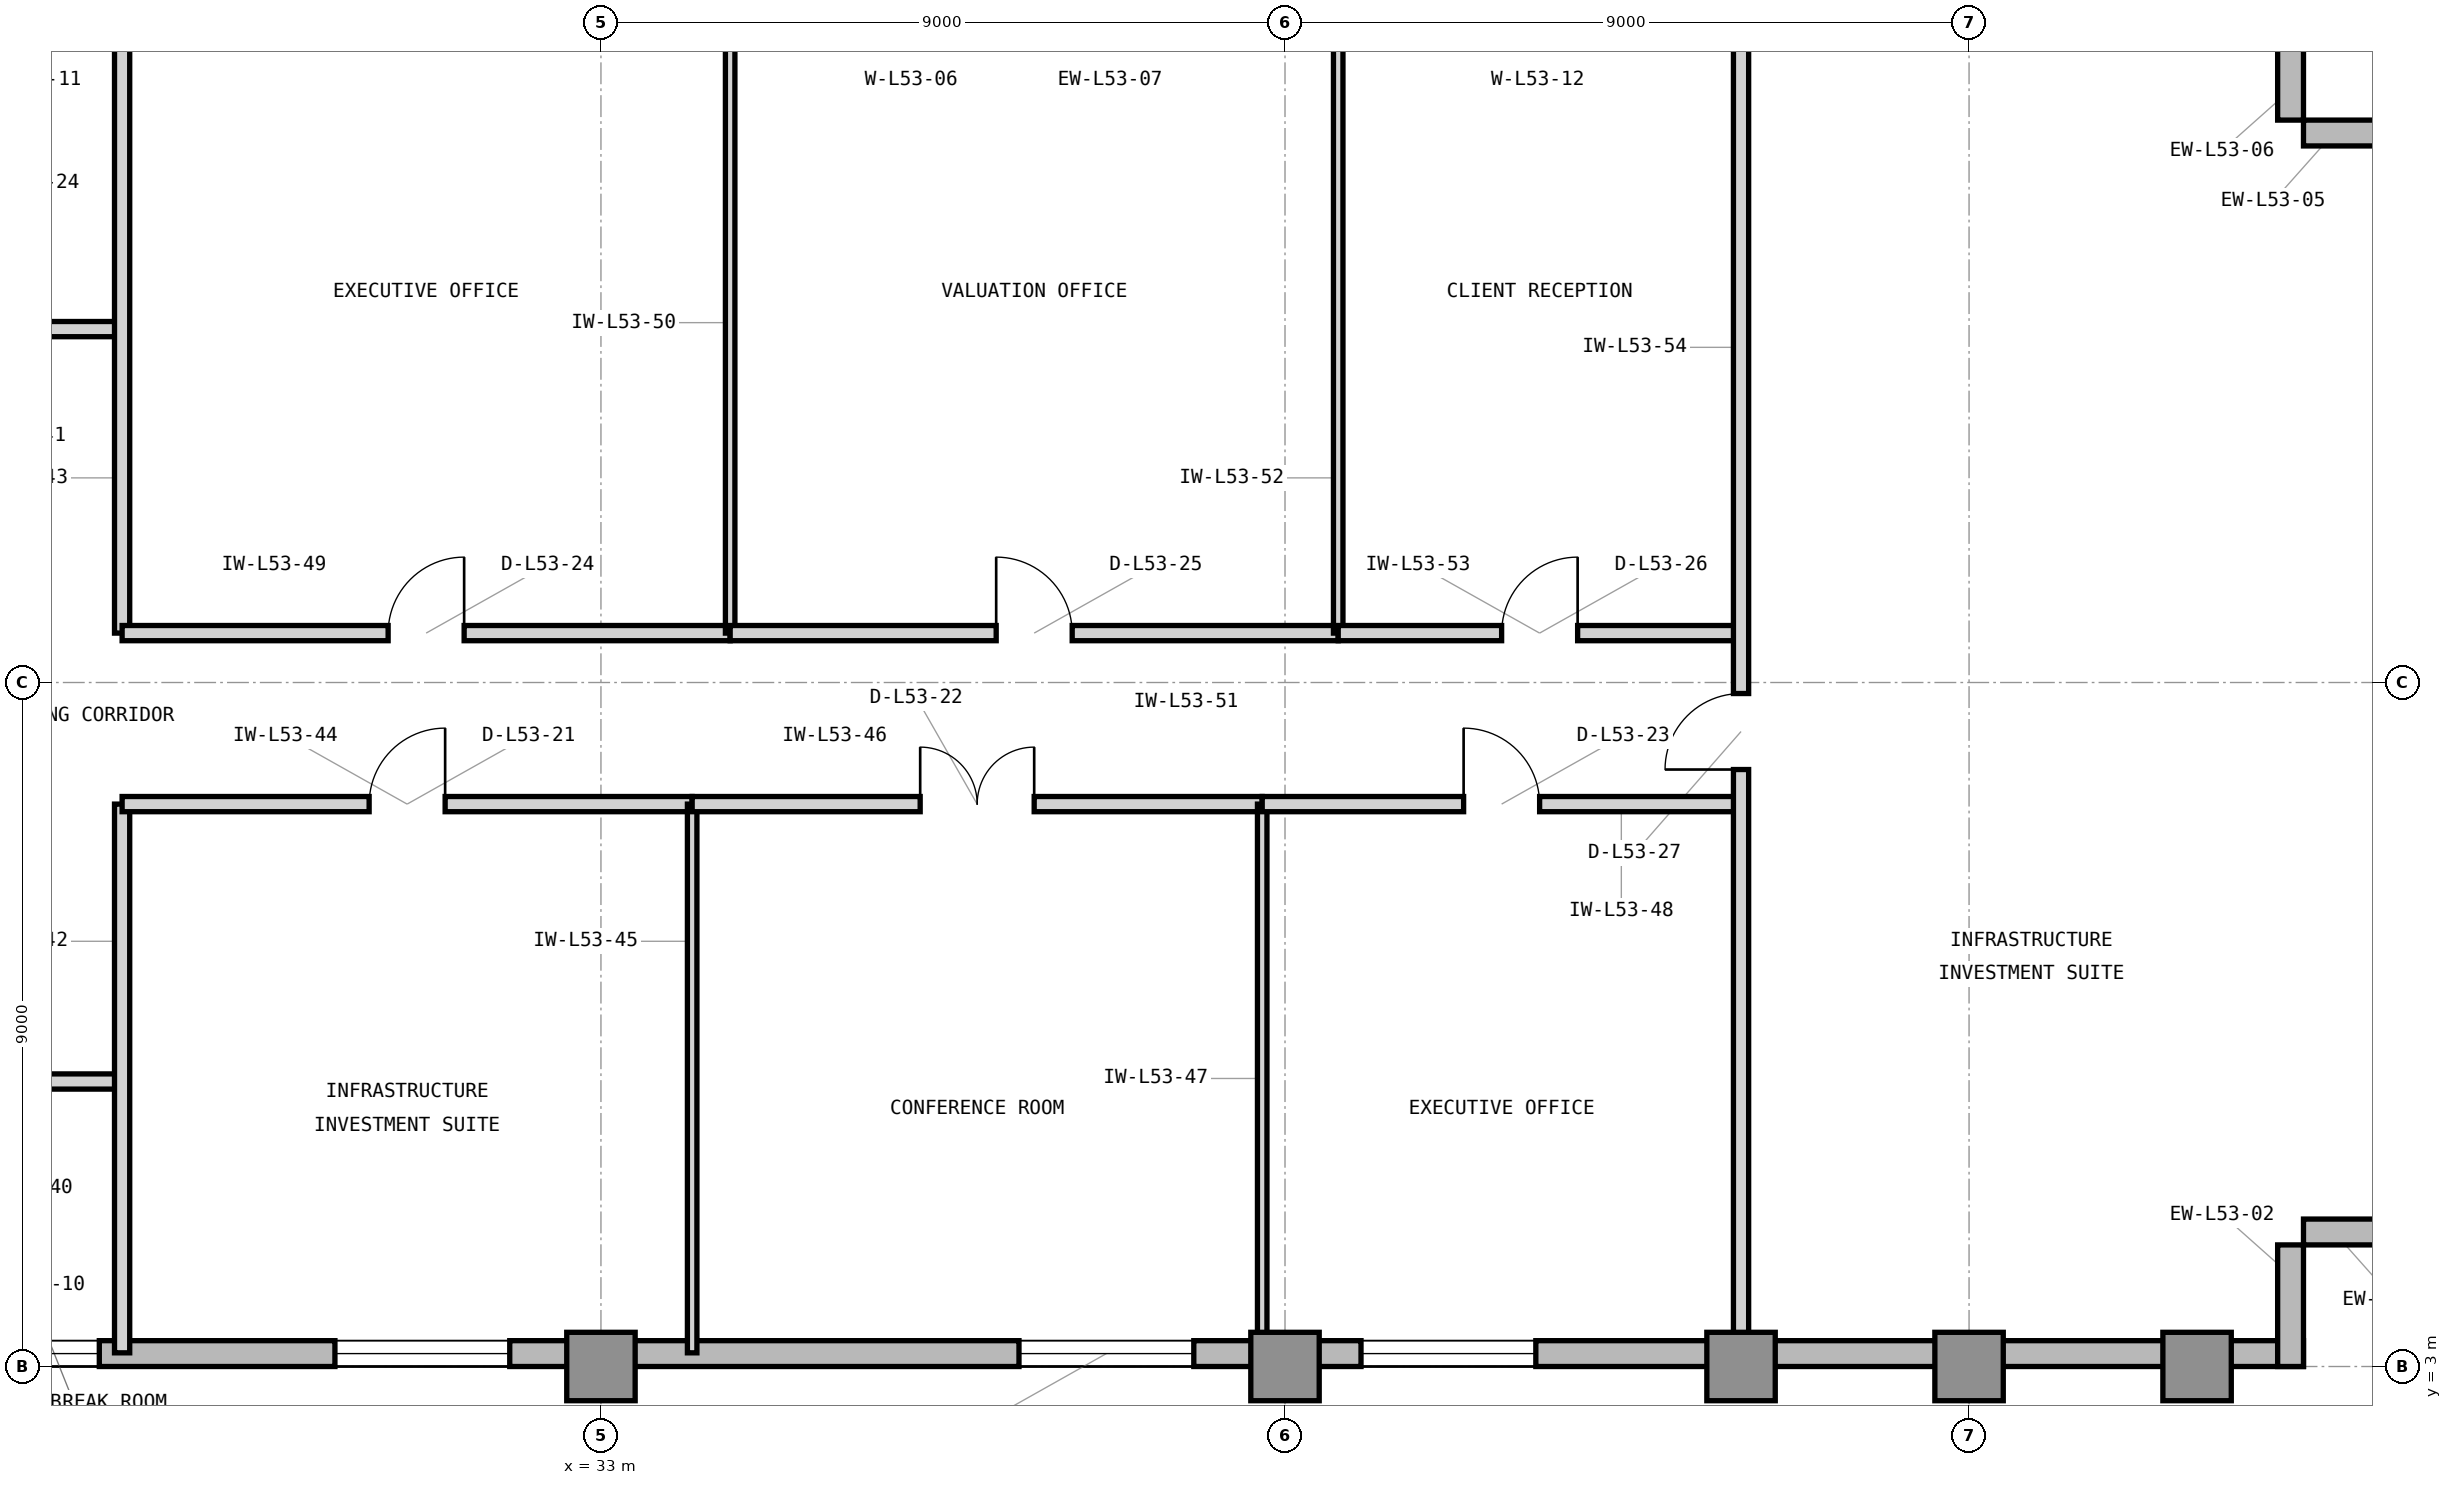
"""IFC4 building model, lengths in metres.
Left out: names, types, materials, properties, quantities, classifications, styles, units other than length and angle.
Written with IfcOpenShell. Run it as: python <this file> out.ifc"""

import sys

from ifc_helpers import new_model, si_unit, direction, frame, frame_2d, origin, origin_2d, place, context, subcontext, project, spatial, rectangle, extrude, element, fill, save


model = new_model("IFC4")
c1 = context("Model", 3, precision=1e-05, world=origin(), true_north=direction((0.0, 1.0)))
c2 = subcontext(c1, "Body", "Model", "MODEL_VIEW")
j1 = project(units=[si_unit("LENGTHUNIT", "METRE"), si_unit("PLANEANGLEUNIT", "RADIAN")], contexts=[c1])
p1 = place(None, origin())
s1 = spatial("IfcSite", under=j1, at=p1, CompositionType="ELEMENT")
p2 = place(p1, origin())
s2 = spatial("IfcBuilding", under=s1, at=p2, CompositionType="ELEMENT")
p3 = place(p2, frame((0.0, 0.0, 219.0)))
s3 = spatial("IfcBuildingStorey", under=s2, at=p3, CompositionType="ELEMENT", Elevation=219.0)
for number, where, z_axis, x_axis in (
    (1, (33.0, 3.0, 0.0), (0.0, 0.0, 1.0), (1.0, 0.0, 0.0)),
    (2, (42.0, 3.0, 0.0), (0.0, 0.0, 1.0), (1.0, 0.0, 0.0)),
    (3, (48.0, 3.0, 0.0), (0.0, 0.0, 1.0), (1.0, 0.0, 0.0)),
    (4, (51.0, 3.0, 0.0), (0.0, 0.0, 1.0), (1.0, 0.0, 0.0)),
    (5, (54.0, 3.0, 0.0), (0.0, 0.0, 1.0), (1.0, 0.0, 0.0)),
):
    element("IfcColumn", number, at=place(p3, frame(where, z_axis=z_axis, x_axis=x_axis)), inside=s3, PredefinedType="COLUMN", context=c2, shape_type="SweptSolid", body=[
        extrude(rectangle(XDim=0.9, YDim=0.9, at=origin_2d()), origin(), (0.0, 0.0, 1.0), 3.9),
    ])
p4 = place(p3, frame((23.9, 3.17, 0.0), z_axis=(0.0, 0.0, 1.0), x_axis=(1.0, 0.0, 0.0)))
e6 = element("IfcWall", 6, at=p4, inside=s3, PredefinedType="STANDARD", context=c2, shape_type="SweptSolid", body=[
    extrude(rectangle(XDim=31.5, YDim=0.34, at=frame_2d((15.75, 0.0))), origin(), (0.0, 0.0, 1.0), 3.65),
])
p5 = place(p4, frame((5.6, 0.0, 0.9)))
e7 = element("IfcOpeningElement", 7, at=p5, cuts=e6, PredefinedType="OPENING", context=c2, shape_type="SweptSolid", body=[
    extrude(rectangle(XDim=2.3, YDim=2.2, at=frame_2d((1.15, 1.1))), frame((0.0, 0.18, 0.0), z_axis=(0.0, -1.0, 0.0), x_axis=(1.0, 0.0, 0.0)), (0.0, 0.0, 1.0), 0.36),
])
p6 = place(p4, frame((14.6, 0.0, 0.9)))
e8 = element("IfcOpeningElement", 8, at=p6, cuts=e6, PredefinedType="OPENING", context=c2, shape_type="SweptSolid", body=[
    extrude(rectangle(XDim=2.3, YDim=2.2, at=frame_2d((1.15, 1.1))), frame((0.0, 0.18, 0.0), z_axis=(0.0, -1.0, 0.0), x_axis=(1.0, 0.0, 0.0)), (0.0, 0.0, 1.0), 0.36),
])
p7 = place(p4, frame((19.1, 0.0, 0.9)))
e9 = element("IfcOpeningElement", 9, at=p7, cuts=e6, PredefinedType="OPENING", context=c2, shape_type="SweptSolid", body=[
    extrude(rectangle(XDim=2.3, YDim=2.2, at=frame_2d((1.15, 1.1))), frame((0.0, 0.18, 0.0), z_axis=(0.0, -1.0, 0.0), x_axis=(1.0, 0.0, 0.0)), (0.0, 0.0, 1.0), 0.36),
])
p8 = place(p4, frame((0.9, 0.0, 0.9)))
e10 = element("IfcOpeningElement", 10, at=p8, cuts=e6, PredefinedType="OPENING", context=c2, shape_type="SweptSolid", body=[
    extrude(rectangle(XDim=1.6, YDim=2.2, at=frame_2d((0.8, 1.1))), frame((0.0, 0.18, 0.0), z_axis=(0.0, -1.0, 0.0), x_axis=(1.0, 0.0, 0.0)), (0.0, 0.0, 1.0), 0.36),
])
for number, where, z_axis, x_axis in (
    (11, (55.23, 3.0, 0.0), (0.0, 0.0, 1.0), (0.0, 1.0, 0.0)),
    (12, (55.4, 4.77, 0.0), (0.0, 0.0, 1.0), (1.0, 0.0, 0.0)),
    (13, (57.0, 19.23, 0.0), (0.0, 0.0, 1.0), (-1.0, 0.0, 0.0)),
    (14, (55.23, 19.4, 0.0), (0.0, 0.0, 1.0), (0.0, 1.0, 0.0)),
):
    element("IfcWall", number, at=place(p3, frame(where, z_axis=z_axis, x_axis=x_axis)), inside=s3, PredefinedType="STANDARD", context=c2, shape_type="SweptSolid", body=[
        extrude(rectangle(XDim=1.6, YDim=0.34, at=frame_2d((0.8, 0.0))), origin(), (0.0, 0.0, 1.0), 3.65),
    ])
p9 = place(p3, frame((23.85, 6.75, 0.0), z_axis=(0.0, 0.0, 1.0), x_axis=(1.0, 0.0, 0.0)))
e15 = element("IfcWall", 15, at=p9, inside=s3, PredefinedType="PARTITIONING", context=c2, shape_type="SweptSolid", body=[
    extrude(rectangle(XDim=2.85, YDim=0.2, at=frame_2d((1.425, 0.0))), origin(), (0.0, 0.0, 1.0), 3.64),
])
p10 = place(p9, frame((0.7, 0.0, 0.0)))
e16 = element("IfcOpeningElement", 16, at=p10, cuts=e15, PredefinedType="OPENING", context=c2, shape_type="SweptSolid", body=[
    extrude(rectangle(XDim=1.0, YDim=2.15, at=frame_2d((0.5, 1.075))), frame((0.0, 0.11, 0.0), z_axis=(0.0, -1.0, 0.0), x_axis=(1.0, 0.0, 0.0)), (0.0, 0.0, 1.0), 0.22),
])
p11 = place(p3, frame((23.85, 16.65, 0.0), z_axis=(0.0, 0.0, 1.0), x_axis=(1.0, 0.0, 0.0)))
e17 = element("IfcWall", 17, at=p11, inside=s3, PredefinedType="PARTITIONING", context=c2, shape_type="SweptSolid", body=[
    extrude(rectangle(XDim=2.85, YDim=0.2, at=frame_2d((1.425, 0.0))), origin(), (0.0, 0.0, 1.0), 3.64),
])
p12 = place(p11, frame((0.7, 0.0, 0.0)))
e18 = element("IfcOpeningElement", 18, at=p12, cuts=e17, PredefinedType="OPENING", context=c2, shape_type="SweptSolid", body=[
    extrude(rectangle(XDim=1.0, YDim=2.15, at=frame_2d((0.5, 1.075))), frame((0.0, 0.11, 0.0), z_axis=(0.0, -1.0, 0.0), x_axis=(1.0, 0.0, 0.0)), (0.0, 0.0, 1.0), 0.22),
])
p13 = place(p3, frame((26.7, 3.18, 0.0), z_axis=(0.0, 0.0, 1.0), x_axis=(0.0, 1.0, 0.0)))
e19 = element("IfcWall", 19, at=p13, inside=s3, PredefinedType="PARTITIONING", context=c2, shape_type="SweptSolid", body=[
    extrude(rectangle(XDim=7.22, YDim=0.2, at=frame_2d((3.61, 0.0))), origin(), (0.0, 0.0, 1.0), 3.64),
])
p14 = place(p3, frame((26.7, 12.65, 0.0), z_axis=(0.0, 0.0, 1.0), x_axis=(0.0, 1.0, 0.0)))
e20 = element("IfcWall", 20, at=p14, inside=s3, PredefinedType="PARTITIONING", context=c2, shape_type="SweptSolid", body=[
    extrude(rectangle(XDim=8.17, YDim=0.2, at=frame_2d((4.085, 0.0))), origin(), (0.0, 0.0, 1.0), 3.64),
])
p15 = place(p3, frame((26.7, 10.4, 0.0), z_axis=(0.0, 0.0, 1.0), x_axis=(1.0, 0.0, 0.0)))
e21 = element("IfcWall", 21, at=p15, inside=s3, PredefinedType="PARTITIONING", context=c2, shape_type="SweptSolid", body=[
    extrude(rectangle(XDim=7.5, YDim=0.2, at=frame_2d((3.75, 0.0))), origin(), (0.0, 0.0, 1.0), 3.64),
])
p16 = place(p15, frame((3.25, 0.0, 0.0)))
e22 = element("IfcOpeningElement", 22, at=p16, cuts=e21, PredefinedType="OPENING", context=c2, shape_type="SweptSolid", body=[
    extrude(rectangle(XDim=1.0, YDim=2.15, at=frame_2d((0.5, 1.075))), frame((0.0, 0.11, 0.0), z_axis=(0.0, -1.0, 0.0), x_axis=(1.0, 0.0, 0.0)), (0.0, 0.0, 1.0), 0.22),
])
p17 = place(p3, frame((34.2, 3.18, 0.0), z_axis=(0.0, 0.0, 1.0), x_axis=(0.0, 1.0, 0.0)))
e23 = element("IfcWall", 23, at=p17, inside=s3, PredefinedType="PARTITIONING", context=c2, shape_type="SweptSolid", body=[
    extrude(rectangle(XDim=7.22, YDim=0.125, at=frame_2d((3.61, 0.0))), origin(), (0.0, 0.0, 1.0), 3.64),
])
p18 = place(p3, frame((34.2, 10.4, 0.0), z_axis=(0.0, 0.0, 1.0), x_axis=(1.0, 0.0, 0.0)))
e24 = element("IfcWall", 24, at=p18, inside=s3, PredefinedType="PARTITIONING", context=c2, shape_type="SweptSolid", body=[
    extrude(rectangle(XDim=7.5, YDim=0.2, at=frame_2d((3.75, 0.0))), origin(), (0.0, 0.0, 1.0), 3.64),
])
p19 = place(p18, frame((3.0, 0.0, 0.0)))
e25 = element("IfcOpeningElement", 25, at=p19, cuts=e24, PredefinedType="OPENING", context=c2, shape_type="SweptSolid", body=[
    extrude(rectangle(XDim=1.5, YDim=2.3, at=frame_2d((0.75, 1.15))), frame((0.0, 0.11, 0.0), z_axis=(0.0, -1.0, 0.0), x_axis=(1.0, 0.0, 0.0)), (0.0, 0.0, 1.0), 0.22),
])
p20 = place(p3, frame((41.7, 3.18, 0.0), z_axis=(0.0, 0.0, 1.0), x_axis=(0.0, 1.0, 0.0)))
e26 = element("IfcWall", 26, at=p20, inside=s3, PredefinedType="PARTITIONING", context=c2, shape_type="SweptSolid", body=[
    extrude(rectangle(XDim=7.22, YDim=0.125, at=frame_2d((3.61, 0.0))), origin(), (0.0, 0.0, 1.0), 3.64),
])
p21 = place(p3, frame((41.7, 10.4, 0.0), z_axis=(0.0, 0.0, 1.0), x_axis=(1.0, 0.0, 0.0)))
e27 = element("IfcWall", 27, at=p21, inside=s3, PredefinedType="PARTITIONING", context=c2, shape_type="SweptSolid", body=[
    extrude(rectangle(XDim=6.3, YDim=0.2, at=frame_2d((3.15, 0.0))), origin(), (0.0, 0.0, 1.0), 3.64),
])
p22 = place(p21, frame((2.65, 0.0, 0.0)))
e28 = element("IfcOpeningElement", 28, at=p22, cuts=e27, PredefinedType="OPENING", context=c2, shape_type="SweptSolid", body=[
    extrude(rectangle(XDim=1.0, YDim=2.15, at=frame_2d((0.5, 1.075))), frame((0.0, 0.11, 0.0), z_axis=(0.0, -1.0, 0.0), x_axis=(1.0, 0.0, 0.0)), (0.0, 0.0, 1.0), 0.22),
])
p23 = place(p3, frame((26.7, 12.65, 0.0), z_axis=(0.0, 0.0, 1.0), x_axis=(1.0, 0.0, 0.0)))
e29 = element("IfcWall", 29, at=p23, inside=s3, PredefinedType="PARTITIONING", context=c2, shape_type="SweptSolid", body=[
    extrude(rectangle(XDim=8.0, YDim=0.2, at=frame_2d((4.0, 0.0))), origin(), (0.0, 0.0, 1.0), 3.64),
])
p24 = place(p23, frame((3.5, 0.0, 0.0)))
e30 = element("IfcOpeningElement", 30, at=p24, cuts=e29, PredefinedType="OPENING", context=c2, shape_type="SweptSolid", body=[
    extrude(rectangle(XDim=1.0, YDim=2.15, at=frame_2d((0.5, 1.075))), frame((0.0, 0.11, 0.0), z_axis=(0.0, -1.0, 0.0), x_axis=(1.0, 0.0, 0.0)), (0.0, 0.0, 1.0), 0.22),
])
p25 = place(p3, frame((34.7, 12.65, 0.0), z_axis=(0.0, 0.0, 1.0), x_axis=(0.0, 1.0, 0.0)))
e31 = element("IfcWall", 31, at=p25, inside=s3, PredefinedType="PARTITIONING", context=c2, shape_type="SweptSolid", body=[
    extrude(rectangle(XDim=8.17, YDim=0.125, at=frame_2d((4.085, 0.0))), origin(), (0.0, 0.0, 1.0), 3.64),
])
p26 = place(p3, frame((34.7, 12.65, 0.0), z_axis=(0.0, 0.0, 1.0), x_axis=(1.0, 0.0, 0.0)))
e32 = element("IfcWall", 32, at=p26, inside=s3, PredefinedType="PARTITIONING", context=c2, shape_type="SweptSolid", body=[
    extrude(rectangle(XDim=8.0, YDim=0.2, at=frame_2d((4.0, 0.0))), origin(), (0.0, 0.0, 1.0), 3.64),
])
p27 = place(p26, frame((3.5, 0.0, 0.0)))
e33 = element("IfcOpeningElement", 33, at=p27, cuts=e32, PredefinedType="OPENING", context=c2, shape_type="SweptSolid", body=[
    extrude(rectangle(XDim=1.0, YDim=2.15, at=frame_2d((0.5, 1.075))), frame((0.0, 0.11, 0.0), z_axis=(0.0, -1.0, 0.0), x_axis=(1.0, 0.0, 0.0)), (0.0, 0.0, 1.0), 0.22),
])
p28 = place(p3, frame((42.7, 12.65, 0.0), z_axis=(0.0, 0.0, 1.0), x_axis=(0.0, 1.0, 0.0)))
e34 = element("IfcWall", 34, at=p28, inside=s3, PredefinedType="PARTITIONING", context=c2, shape_type="SweptSolid", body=[
    extrude(rectangle(XDim=8.17, YDim=0.125, at=frame_2d((4.085, 0.0))), origin(), (0.0, 0.0, 1.0), 3.64),
])
p29 = place(p3, frame((42.7, 12.65, 0.0), z_axis=(0.0, 0.0, 1.0), x_axis=(1.0, 0.0, 0.0)))
e35 = element("IfcWall", 35, at=p29, inside=s3, PredefinedType="PARTITIONING", context=c2, shape_type="SweptSolid", body=[
    extrude(rectangle(XDim=5.3, YDim=0.2, at=frame_2d((2.65, 0.0))), origin(), (0.0, 0.0, 1.0), 3.64),
])
p30 = place(p29, frame((2.15, 0.0, 0.0)))
e36 = element("IfcOpeningElement", 36, at=p30, cuts=e35, PredefinedType="OPENING", context=c2, shape_type="SweptSolid", body=[
    extrude(rectangle(XDim=1.0, YDim=2.15, at=frame_2d((0.5, 1.075))), frame((0.0, 0.11, 0.0), z_axis=(0.0, -1.0, 0.0), x_axis=(1.0, 0.0, 0.0)), (0.0, 0.0, 1.0), 0.22),
])
p31 = place(p3, frame((48.0, 3.18, 0.0), z_axis=(0.0, 0.0, 1.0), x_axis=(0.0, 1.0, 0.0)))
e37 = element("IfcWall", 37, at=p31, inside=s3, PredefinedType="PARTITIONING", context=c2, shape_type="SweptSolid", body=[
    extrude(rectangle(XDim=17.64, YDim=0.2, at=frame_2d((8.82, 0.0))), origin(), (0.0, 0.0, 1.0), 3.073),
])
p32 = place(p31, frame((7.675, 0.0, 0.0)))
e38 = element("IfcOpeningElement", 38, at=p32, cuts=e37, PredefinedType="OPENING", context=c2, shape_type="SweptSolid", body=[
    extrude(rectangle(XDim=1.0, YDim=2.15, at=frame_2d((0.5, 1.075))), frame((0.0, 0.11, 0.0), z_axis=(0.0, -1.0, 0.0), x_axis=(1.0, 0.0, 0.0)), (0.0, 0.0, 1.0), 0.22),
])
p33 = place(p5, origin())
e39 = element("IfcWindow", 39, at=p33, inside=s3, PartitioningType="SINGLE_PANEL", PredefinedType="WINDOW", context=c2, shape_type="SweptSolid", body=[
    extrude(rectangle(XDim=2.3, YDim=2.2, at=frame_2d((1.15, 1.1))), frame((0.0, 0.11, 0.0), z_axis=(0.0, -1.0, 0.0), x_axis=(1.0, 0.0, 0.0)), (0.0, 0.0, 1.0), 0.06),
])
fill(e7, e39)
p34 = place(p6, origin())
e40 = element("IfcWindow", 40, at=p34, inside=s3, PartitioningType="SINGLE_PANEL", PredefinedType="WINDOW", context=c2, shape_type="SweptSolid", body=[
    extrude(rectangle(XDim=2.3, YDim=2.2, at=frame_2d((1.15, 1.1))), frame((0.0, 0.11, 0.0), z_axis=(0.0, -1.0, 0.0), x_axis=(1.0, 0.0, 0.0)), (0.0, 0.0, 1.0), 0.06),
])
fill(e8, e40)
p35 = place(p7, origin())
e41 = element("IfcWindow", 41, at=p35, inside=s3, PartitioningType="SINGLE_PANEL", PredefinedType="WINDOW", context=c2, shape_type="SweptSolid", body=[
    extrude(rectangle(XDim=2.3, YDim=2.2, at=frame_2d((1.15, 1.1))), frame((0.0, 0.11, 0.0), z_axis=(0.0, -1.0, 0.0), x_axis=(1.0, 0.0, 0.0)), (0.0, 0.0, 1.0), 0.06),
])
fill(e9, e41)
p36 = place(p16, origin())
e42 = element("IfcDoor", 42, at=p36, inside=s3, OperationType="SINGLE_SWING_RIGHT", PredefinedType="DOOR", context=c2, shape_type="SweptSolid", body=[
    extrude(rectangle(XDim=1.0, YDim=2.15, at=frame_2d((0.5, 1.075))), frame((0.0, 0.025, 0.0), z_axis=(0.0, -1.0, 0.0), x_axis=(1.0, 0.0, 0.0)), (0.0, 0.0, 1.0), 0.05),
])
fill(e22, e42)
p37 = place(p19, origin())
e43 = element("IfcDoor", 43, at=p37, inside=s3, OperationType="DOUBLE_DOOR_SINGLE_SWING", PredefinedType="DOOR", context=c2, shape_type="SweptSolid", body=[
    extrude(rectangle(XDim=1.5, YDim=2.3, at=frame_2d((0.75, 1.15))), frame((0.0, 0.025, 0.0), z_axis=(0.0, -1.0, 0.0), x_axis=(1.0, 0.0, 0.0)), (0.0, 0.0, 1.0), 0.05),
])
fill(e25, e43)
p38 = place(p22, origin())
e44 = element("IfcDoor", 44, at=p38, inside=s3, OperationType="SINGLE_SWING_LEFT", PredefinedType="DOOR", context=c2, shape_type="SweptSolid", body=[
    extrude(rectangle(XDim=1.0, YDim=2.15, at=frame_2d((0.5, 1.075))), frame((0.0, 0.025, 0.0), z_axis=(0.0, -1.0, 0.0), x_axis=(1.0, 0.0, 0.0)), (0.0, 0.0, 1.0), 0.05),
])
fill(e28, e44)
p39 = place(p24, origin())
e45 = element("IfcDoor", 45, at=p39, inside=s3, OperationType="SINGLE_SWING_RIGHT", PredefinedType="DOOR", context=c2, shape_type="SweptSolid", body=[
    extrude(rectangle(XDim=1.0, YDim=2.15, at=frame_2d((0.5, 1.075))), frame((0.0, 0.025, 0.0), z_axis=(0.0, -1.0, 0.0), x_axis=(1.0, 0.0, 0.0)), (0.0, 0.0, 1.0), 0.05),
])
fill(e30, e45)
p40 = place(p27, origin())
e46 = element("IfcDoor", 46, at=p40, inside=s3, OperationType="SINGLE_SWING_LEFT", PredefinedType="DOOR", context=c2, shape_type="SweptSolid", body=[
    extrude(rectangle(XDim=1.0, YDim=2.15, at=frame_2d((0.5, 1.075))), frame((0.0, 0.025, 0.0), z_axis=(0.0, -1.0, 0.0), x_axis=(1.0, 0.0, 0.0)), (0.0, 0.0, 1.0), 0.05),
])
fill(e33, e46)
p41 = place(p30, origin())
e47 = element("IfcDoor", 47, at=p41, inside=s3, OperationType="SINGLE_SWING_RIGHT", PredefinedType="DOOR", context=c2, shape_type="SweptSolid", body=[
    extrude(rectangle(XDim=1.0, YDim=2.15, at=frame_2d((0.5, 1.075))), frame((0.0, 0.025, 0.0), z_axis=(0.0, -1.0, 0.0), x_axis=(1.0, 0.0, 0.0)), (0.0, 0.0, 1.0), 0.05),
])
fill(e36, e47)
p42 = place(p32, origin())
e48 = element("IfcDoor", 48, at=p42, inside=s3, OperationType="SINGLE_SWING_LEFT", PredefinedType="DOOR", context=c2, shape_type="SweptSolid", body=[
    extrude(rectangle(XDim=1.0, YDim=2.15, at=frame_2d((0.5, 1.075))), frame((0.0, 0.025, 0.0), z_axis=(0.0, -1.0, 0.0), x_axis=(1.0, 0.0, 0.0)), (0.0, 0.0, 1.0), 0.05),
])
fill(e38, e48)
p43 = place(p8, origin())
e49 = element("IfcWindow", 49, at=p43, inside=s3, PartitioningType="SINGLE_PANEL", PredefinedType="WINDOW", context=c2, shape_type="SweptSolid", body=[
    extrude(rectangle(XDim=1.6, YDim=2.2, at=frame_2d((0.8, 1.1))), frame((0.0, 0.11, 0.0), z_axis=(0.0, -1.0, 0.0), x_axis=(1.0, 0.0, 0.0)), (0.0, 0.0, 1.0), 0.06),
])
fill(e10, e49)
save(model, sys.argv[1])
